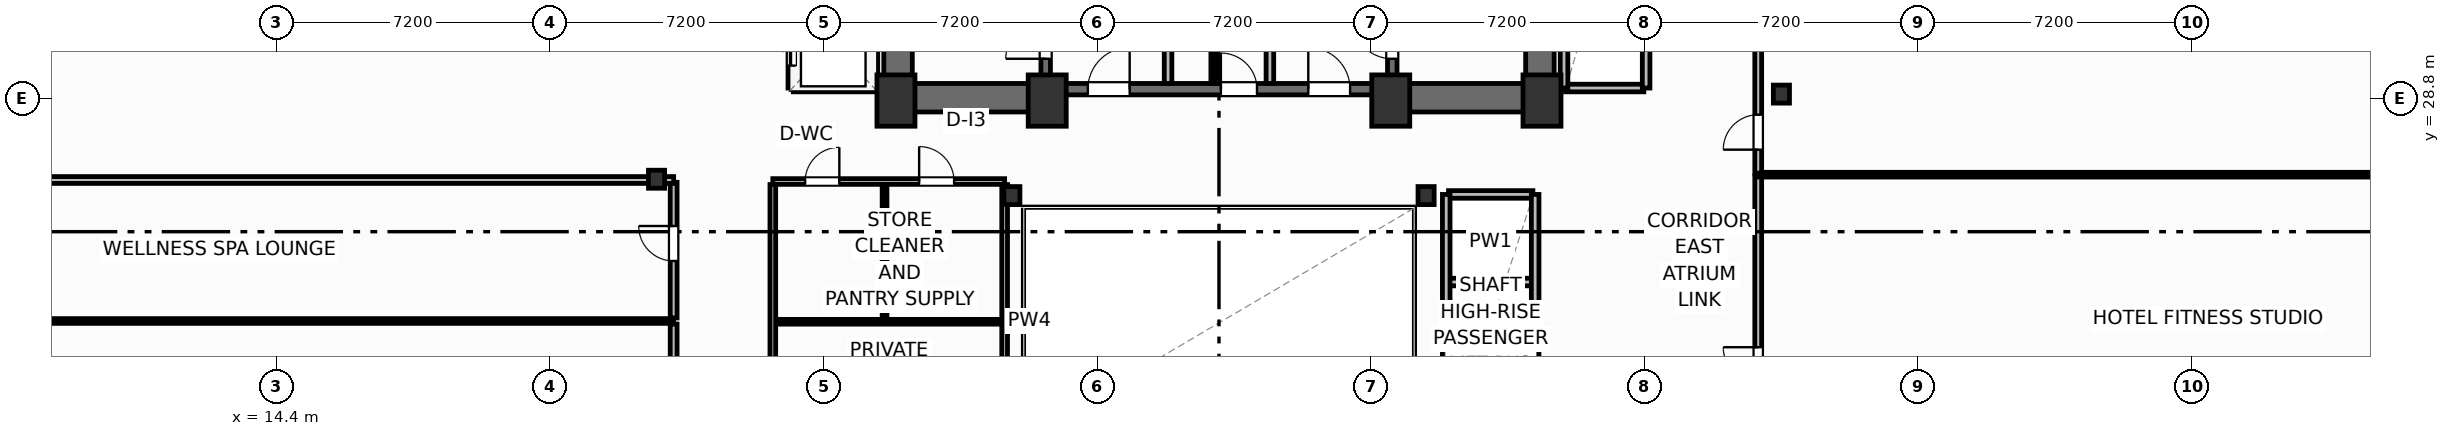
"""IFC4 building model, lengths in metres.
Left out: names, types, materials, properties, quantities, classifications, styles, units other than length and angle.
Written with IfcOpenShell. Run it as: python <this file> out.ifc"""

import sys

from ifc_helpers import new_model, si_unit, direction, frame, frame_2d, origin, origin_2d, place, context, subcontext, project, spatial, rectangle, i_section, extrude, element, fill, save


model = new_model("IFC4")
c1 = context("Model", 3, precision=1e-05, world=origin(), true_north=direction((0.0, 1.0)))
c2 = subcontext(c1, "Body", "Model", "MODEL_VIEW")
j1 = project(units=[si_unit("LENGTHUNIT", "METRE"), si_unit("PLANEANGLEUNIT", "RADIAN")], contexts=[c1])
p1 = place(None, origin())
s1 = spatial("IfcSite", under=j1, at=p1, CompositionType="ELEMENT")
p2 = place(p1, origin())
s2 = spatial("IfcBuilding", under=s1, at=p2, CompositionType="ELEMENT")
p3 = place(p2, frame((0.0, 0.0, 79.9)))
s3 = spatial("IfcBuildingStorey", under=s2, at=p3, CompositionType="ELEMENT", Elevation=79.9)
for number, where, z_axis, x_axis in (
    (1, (30.7, 28.75, 0.0), (0.0, 0.0, 1.0), (1.0, 0.0, 0.0)),
    (2, (34.68, 28.75, 0.0), (0.0, 0.0, 1.0), (1.0, 0.0, 0.0)),
    (3, (43.72, 28.75, 0.0), (0.0, 0.0, 1.0), (1.0, 0.0, 0.0)),
    (4, (47.7, 28.75, 0.0), (0.0, 0.0, 1.0), (1.0, 0.0, 0.0)),
):
    element("IfcColumn", number, at=place(p3, frame(where, z_axis=z_axis, x_axis=x_axis)), inside=s3, PredefinedType="COLUMN", context=c2, shape_type="SweptSolid", body=[
        extrude(rectangle(XDim=1.0, YDim=1.35, at=origin_2d()), origin(), (0.0, 0.0, 1.0), 3.7),
    ])
for number, where, z_axis, x_axis in (
    (5, (33.75, 26.25, 0.0), (0.0, 0.0, 1.0), (1.0, 0.0, 0.0)),
    (6, (44.65, 26.25, 0.0), (0.0, 0.0, 1.0), (1.0, 0.0, 0.0)),
    (7, (24.4, 26.68, 0.0), (0.0, 0.0, 1.0), (1.0, 0.0, 0.0)),
    (8, (54.0, 28.92, 0.0), (0.0, 0.0, 1.0), (1.0, 0.0, 0.0)),
):
    element("IfcColumn", number, at=place(p3, frame(where, z_axis=z_axis, x_axis=x_axis)), inside=s3, PredefinedType="COLUMN", context=c2, shape_type="SweptSolid", body=[
        extrude(i_section(OverallWidth=0.424, OverallDepth=0.474, WebThickness=0.048, FlangeThickness=0.077, FilletRadius=0.025, at=origin_2d()), origin(), (0.0, 0.0, 1.0), 3.7),
    ])
for number, where, z_axis, x_axis in (
    (9, (30.755, 29.2, 0.0), (0.0, 0.0, 1.0), (0.0, 1.0, 0.0)),
    (10, (47.645, 29.2, 0.0), (0.0, 0.0, 1.0), (0.0, 1.0, 0.0)),
):
    element("IfcWall", number, at=place(p3, frame(where, z_axis=z_axis, x_axis=x_axis)), inside=s3, PredefinedType="SHEAR", context=c2, shape_type="SweptSolid", body=[
        extrude(rectangle(XDim=9.22, YDim=0.75, at=frame_2d((4.61, 0.0))), origin(), (0.0, 0.0, 1.0), 3.45),
    ])
p4 = place(p3, frame((30.38, 28.825, 0.0), z_axis=(0.0, 0.0, 1.0), x_axis=(1.0, 0.0, 0.0)))
e11 = element("IfcWall", 11, at=p4, inside=s3, PredefinedType="SHEAR", context=c2, shape_type="SweptSolid", body=[
    extrude(rectangle(XDim=4.42, YDim=0.75, at=frame_2d((2.21, 0.0))), origin(), (0.0, 0.0, 1.0), 3.45),
])
p5 = place(p3, frame((43.6, 28.825, 0.0), z_axis=(0.0, 0.0, 1.0), x_axis=(1.0, 0.0, 0.0)))
e12 = element("IfcWall", 12, at=p5, inside=s3, PredefinedType="SHEAR", context=c2, shape_type="SweptSolid", body=[
    extrude(rectangle(XDim=4.42, YDim=0.75, at=frame_2d((2.21, 0.0))), origin(), (0.0, 0.0, 1.0), 3.45),
])
p6 = place(p3, frame((34.8, 29.05, 0.0), z_axis=(0.0, 0.0, 1.0), x_axis=(1.0, 0.0, 0.0)))
e13 = element("IfcWall", 13, at=p6, inside=s3, PredefinedType="SHEAR", context=c2, shape_type="SweptSolid", body=[
    extrude(rectangle(XDim=8.8, YDim=0.3, at=frame_2d((4.4, 0.0))), origin(), (0.0, 0.0, 1.0), 3.45),
])
p7 = place(p6, frame((0.95, 0.0, 0.0)))
e14 = element("IfcOpeningElement", 14, at=p7, cuts=e13, PredefinedType="OPENING", context=c2, shape_type="SweptSolid", body=[
    extrude(rectangle(XDim=1.1, YDim=2.15, at=frame_2d((0.55, 1.075))), frame((0.0, 0.16, 0.0), z_axis=(0.0, -1.0, 0.0), x_axis=(1.0, 0.0, 0.0)), (0.0, 0.0, 1.0), 0.32),
])
p8 = place(p6, frame((6.75, 0.0, 0.0)))
e15 = element("IfcOpeningElement", 15, at=p8, cuts=e13, PredefinedType="OPENING", context=c2, shape_type="SweptSolid", body=[
    extrude(rectangle(XDim=1.1, YDim=2.15, at=frame_2d((0.55, 1.075))), frame((0.0, 0.16, 0.0), z_axis=(0.0, -1.0, 0.0), x_axis=(1.0, 0.0, 0.0)), (0.0, 0.0, 1.0), 0.32),
])
p9 = place(p6, frame((4.45, 0.0, 0.0)))
e16 = element("IfcOpeningElement", 16, at=p9, cuts=e13, PredefinedType="OPENING", context=c2, shape_type="SweptSolid", body=[
    extrude(rectangle(XDim=0.95, YDim=2.15, at=frame_2d((0.475, 1.075))), frame((0.0, 0.16, 0.0), z_axis=(0.0, -1.0, 0.0), x_axis=(1.0, 0.0, 0.0)), (0.0, 0.0, 1.0), 0.32),
])
p10 = place(p3, frame((34.64, 29.2, 0.0), z_axis=(0.0, 0.0, 1.0), x_axis=(0.0, 1.0, 0.0)))
e17 = element("IfcWall", 17, at=p10, inside=s3, PredefinedType="SHEAR", context=c2, shape_type="SweptSolid", body=[
    extrude(rectangle(XDim=9.22, YDim=0.25, at=frame_2d((4.61, 0.0))), origin(), (0.0, 0.0, 1.0), 3.45),
])
p11 = place(p10, frame((0.65, 0.0, 0.0)))
e18 = element("IfcOpeningElement", 18, at=p11, cuts=e17, PredefinedType="OPENING", context=c2, shape_type="SweptSolid", body=[
    extrude(rectangle(XDim=1.05, YDim=2.15, at=frame_2d((0.525, 1.075))), frame((0.0, 0.135, 0.0), z_axis=(0.0, -1.0, 0.0), x_axis=(1.0, 0.0, 0.0)), (0.0, 0.0, 1.0), 0.27),
])
p12 = place(p3, frame((43.76, 29.2, 0.0), z_axis=(0.0, 0.0, 1.0), x_axis=(0.0, 1.0, 0.0)))
e19 = element("IfcWall", 19, at=p12, inside=s3, PredefinedType="SHEAR", context=c2, shape_type="SweptSolid", body=[
    extrude(rectangle(XDim=9.22, YDim=0.25, at=frame_2d((4.61, 0.0))), origin(), (0.0, 0.0, 1.0), 3.45),
])
p13 = place(p12, frame((0.65, 0.0, 0.0)))
e20 = element("IfcOpeningElement", 20, at=p13, cuts=e19, PredefinedType="OPENING", context=c2, shape_type="SweptSolid", body=[
    extrude(rectangle(XDim=1.05, YDim=2.15, at=frame_2d((0.525, 1.075))), frame((0.0, 0.135, 0.0), z_axis=(0.0, -1.0, 0.0), x_axis=(1.0, 0.0, 0.0)), (0.0, 0.0, 1.0), 0.27),
])
p14 = place(p3, frame((24.85, 19.3, 0.0), z_axis=(0.0, 0.0, 1.0), x_axis=(0.0, 1.0, 0.0)))
e21 = element("IfcWall", 21, at=p14, inside=s3, PredefinedType="PARTITIONING", context=c2, shape_type="SweptSolid", body=[
    extrude(rectangle(XDim=3.57, YDim=0.18, at=frame_2d((1.785, 0.0))), origin(), (0.0, 0.0, 1.0), 3.45),
])
p15 = place(p14, frame((1.5, 0.0, 0.0)))
e22 = element("IfcOpeningElement", 22, at=p15, cuts=e21, PredefinedType="OPENING", context=c2, shape_type="SweptSolid", body=[
    extrude(rectangle(XDim=0.92, YDim=2.05, at=frame_2d((0.46, 1.025))), frame((0.0, 0.1, 0.0), z_axis=(0.0, -1.0, 0.0), x_axis=(1.0, 0.0, 0.0)), (0.0, 0.0, 1.0), 0.2),
])
p16 = place(p3, frame((24.85, 23.03, 0.0), z_axis=(0.0, 0.0, 1.0), x_axis=(0.0, 1.0, 0.0)))
e23 = element("IfcWall", 23, at=p16, inside=s3, PredefinedType="PARTITIONING", context=c2, shape_type="SweptSolid", body=[
    extrude(rectangle(XDim=3.57, YDim=0.18, at=frame_2d((1.785, 0.0))), origin(), (0.0, 0.0, 1.0), 3.45),
])
p17 = place(p16, frame((1.5, 0.0, 0.0)))
e24 = element("IfcOpeningElement", 24, at=p17, cuts=e23, PredefinedType="OPENING", context=c2, shape_type="SweptSolid", body=[
    extrude(rectangle(XDim=0.92, YDim=2.05, at=frame_2d((0.46, 1.025))), frame((0.0, 0.1, 0.0), z_axis=(0.0, -1.0, 0.0), x_axis=(1.0, 0.0, 0.0)), (0.0, 0.0, 1.0), 0.2),
])
p18 = place(p3, frame((1.0, 22.95, 0.0), z_axis=(0.0, 0.0, 1.0), x_axis=(1.0, 0.0, 0.0)))
e25 = element("IfcWall", 25, at=p18, inside=s3, PredefinedType="PARTITIONING", context=c2, shape_type="SweptSolid", body=[
    extrude(rectangle(XDim=23.85, YDim=0.125, at=frame_2d((11.925, 0.0))), origin(), (0.0, 0.0, 1.0), 3.45),
])
p19 = place(p3, frame((-0.086, 26.66, 0.0), z_axis=(0.0, 0.0, 1.0), x_axis=(1.0, 0.0, 0.0)))
e26 = element("IfcWall", 26, at=p19, inside=s3, PredefinedType="PARTITIONING", context=c2, shape_type="SweptSolid", body=[
    extrude(rectangle(XDim=24.936, YDim=0.18, at=frame_2d((12.468, 0.0))), origin(), (0.0, 0.0, 1.0), 2.662),
])
p20 = place(p3, frame((53.39, 19.24, 0.0), z_axis=(0.0, 0.0, 1.0), x_axis=(0.0, 1.0, 0.0)))
e27 = element("IfcWall", 27, at=p20, inside=s3, PredefinedType="PARTITIONING", context=c2, shape_type="SweptSolid", body=[
    extrude(rectangle(XDim=7.52, YDim=0.18, at=frame_2d((3.76, 0.0))), origin(), (0.0, 0.0, 1.0), 3.45),
])
p21 = place(p20, frame((2.1, 0.0, 0.0)))
e28 = element("IfcOpeningElement", 28, at=p21, cuts=e27, PredefinedType="OPENING", context=c2, shape_type="SweptSolid", body=[
    extrude(rectangle(XDim=0.92, YDim=2.05, at=frame_2d((0.46, 1.025))), frame((0.0, 0.1, 0.0), z_axis=(0.0, -1.0, 0.0), x_axis=(1.0, 0.0, 0.0)), (0.0, 0.0, 1.0), 0.2),
])
p22 = place(p3, frame((53.39, 26.8, 0.0), z_axis=(0.0, 0.0, 1.0), x_axis=(1.0, 0.0, 0.0)))
e29 = element("IfcWall", 29, at=p22, inside=s3, PredefinedType="PARTITIONING", context=c2, shape_type="SweptSolid", body=[
    extrude(rectangle(XDim=23.61, YDim=0.125, at=frame_2d((11.805, 0.0))), origin(), (0.0, 0.0, 1.0), 3.45),
])
p23 = place(p3, frame((53.39, 26.84, 0.0), z_axis=(0.0, 0.0, 1.0), x_axis=(0.0, 1.0, 0.0)))
e30 = element("IfcWall", 30, at=p23, inside=s3, PredefinedType="PARTITIONING", context=c2, shape_type="SweptSolid", body=[
    extrude(rectangle(XDim=12.46, YDim=0.18, at=frame_2d((6.23, 0.0))), origin(), (0.0, 0.0, 1.0), 3.45),
])
p24 = place(p23, frame((0.618, 0.0, 0.0)))
e31 = element("IfcOpeningElement", 31, at=p24, cuts=e30, PredefinedType="OPENING", context=c2, shape_type="SweptSolid", body=[
    extrude(rectangle(XDim=0.92, YDim=2.05, at=frame_2d((0.46, 1.025))), frame((0.0, 0.1, 0.0), z_axis=(0.0, -1.0, 0.0), x_axis=(1.0, 0.0, 0.0)), (0.0, 0.0, 1.0), 0.2),
])
for number, where, z_axis, x_axis in (
    (32, (37.86, 29.2, 0.0), (0.0, 0.0, 1.0), (0.0, 1.0, 0.0)),
    (33, (40.54, 29.2, 0.0), (0.0, 0.0, 1.0), (0.0, 1.0, 0.0)),
):
    element("IfcWall", number, at=place(p3, frame(where, z_axis=z_axis, x_axis=x_axis)), inside=s3, PredefinedType="PARTITIONING", context=c2, shape_type="SweptSolid", body=[
        extrude(rectangle(XDim=5.18, YDim=0.2, at=frame_2d((2.59, 0.0))), origin(), (0.0, 0.0, 1.0), 3.45),
    ])
p25 = place(p3, frame((39.05, 29.2, 0.0), z_axis=(0.0, 0.0, 1.0), x_axis=(0.0, 1.0, 0.0)))
e34 = element("IfcWall", 34, at=p25, inside=s3, PredefinedType="PARTITIONING", context=c2, shape_type="SweptSolid", body=[
    extrude(rectangle(XDim=5.22, YDim=0.125, at=frame_2d((2.61, 0.0))), origin(), (0.0, 0.0, 1.0), 3.45),
])
p26 = place(p25, frame((2.05, 0.0, 0.0)))
e35 = element("IfcOpeningElement", 35, at=p26, cuts=e34, PredefinedType="OPENING", context=c2, shape_type="SweptSolid", body=[
    extrude(rectangle(XDim=0.85, YDim=2.05, at=frame_2d((0.425, 1.025))), frame((0.0, 0.073, 0.0), z_axis=(0.0, -1.0, 0.0), x_axis=(1.0, 0.0, 0.0)), (0.0, 0.0, 1.0), 0.145),
])
p27 = place(p3, frame((27.46, 26.62, 0.0), z_axis=(0.0, 0.0, 1.0), x_axis=(1.0, 0.0, 0.0)))
e36 = element("IfcWall", 36, at=p27, inside=s3, PredefinedType="PARTITIONING", context=c2, shape_type="SweptSolid", body=[
    extrude(rectangle(XDim=6.1, YDim=0.15, at=frame_2d((3.05, 0.0))), origin(), (0.0, 0.0, 1.0), 2.662),
])
p28 = place(p27, frame((0.85, 0.0, 0.0)))
e37 = element("IfcOpeningElement", 37, at=p28, cuts=e36, PredefinedType="OPENING", context=c2, shape_type="SweptSolid", body=[
    extrude(rectangle(XDim=0.9, YDim=2.05, at=frame_2d((0.45, 1.025))), frame((0.0, 0.085, 0.0), z_axis=(0.0, -1.0, 0.0), x_axis=(1.0, 0.0, 0.0)), (0.0, 0.0, 1.0), 0.17),
])
p29 = place(p27, frame((3.85, 0.0, 0.0)))
e38 = element("IfcOpeningElement", 38, at=p29, cuts=e36, PredefinedType="OPENING", context=c2, shape_type="SweptSolid", body=[
    extrude(rectangle(XDim=0.92, YDim=2.05, at=frame_2d((0.46, 1.025))), frame((0.0, 0.085, 0.0), z_axis=(0.0, -1.0, 0.0), x_axis=(1.0, 0.0, 0.0)), (0.0, 0.0, 1.0), 0.17),
])
p30 = place(p3, frame((27.52, 22.93, 0.0), z_axis=(0.0, 0.0, 1.0), x_axis=(1.0, 0.0, 0.0)))
e39 = element("IfcWall", 39, at=p30, inside=s3, PredefinedType="PARTITIONING", context=c2, shape_type="SweptSolid", body=[
    extrude(rectangle(XDim=6.0, YDim=0.125, at=frame_2d((3.0, 0.0))), origin(), (0.0, 0.0, 1.0), 3.45),
])
p31 = place(p3, frame((30.4, 23.0, 0.0), z_axis=(0.0, 0.0, 1.0), x_axis=(0.0, 1.0, 0.0)))
e40 = element("IfcWall", 40, at=p31, inside=s3, PredefinedType="PARTITIONING", context=c2, shape_type="SweptSolid", body=[
    extrude(rectangle(XDim=3.54, YDim=0.125, at=frame_2d((1.77, 0.0))), origin(), (0.0, 0.0, 1.0), 3.45),
])
p32 = place(p3, frame((27.46, 19.38, 0.0), z_axis=(0.0, 0.0, 1.0), x_axis=(0.0, 1.0, 0.0)))
e41 = element("IfcWall", 41, at=p32, inside=s3, PredefinedType="PARTITIONING", context=c2, shape_type="SweptSolid", body=[
    extrude(rectangle(XDim=7.16, YDim=0.15, at=frame_2d((3.58, 0.0))), origin(), (0.0, 0.0, 1.0), 3.45),
])
p33 = place(p32, frame((1.1, 0.0, 0.0)))
e42 = element("IfcOpeningElement", 42, at=p33, cuts=e41, PredefinedType="OPENING", context=c2, shape_type="SweptSolid", body=[
    extrude(rectangle(XDim=0.95, YDim=2.05, at=frame_2d((0.475, 1.025))), frame((0.0, 0.085, 0.0), z_axis=(0.0, -1.0, 0.0), x_axis=(1.0, 0.0, 0.0)), (0.0, 0.0, 1.0), 0.17),
])
p34 = place(p3, frame((33.56, 19.38, 0.0), z_axis=(0.0, 0.0, 1.0), x_axis=(0.0, 1.0, 0.0)))
e43 = element("IfcWall", 43, at=p34, inside=s3, PredefinedType="PARTITIONING", context=c2, shape_type="SweptSolid", body=[
    extrude(rectangle(XDim=7.16, YDim=0.15, at=frame_2d((3.58, 0.0))), origin(), (0.0, 0.0, 1.0), 2.824),
])
p35 = place(p3, frame((28.0, 29.08, 0.0), z_axis=(0.0, 0.0, 1.0), x_axis=(1.0, 0.0, 0.0)))
e44 = element("IfcWall", 44, at=p35, inside=s3, PredefinedType="PARTITIONING", context=c2, shape_type="SweptSolid", body=[
    extrude(rectangle(XDim=2.1, YDim=0.2, at=frame_2d((1.05, 0.0))), origin(), (0.0, 0.0, 1.0), 3.45),
])
p36 = place(p3, frame((30.12, 29.08, 0.0), z_axis=(0.0, 0.0, 1.0), x_axis=(0.0, 1.0, 0.0)))
e45 = element("IfcWall", 45, at=p36, inside=s3, PredefinedType="PARTITIONING", context=c2, shape_type="SweptSolid", body=[
    extrude(rectangle(XDim=6.89, YDim=0.2, at=frame_2d((3.445, 0.0))), origin(), (0.0, 0.0, 1.0), 3.45),
])
p37 = place(p3, frame((27.96, 29.08, 0.0), z_axis=(0.0, 0.0, 1.0), x_axis=(0.0, 1.0, 0.0)))
e46 = element("IfcWall", 46, at=p37, inside=s3, PredefinedType="PARTITIONING", context=c2, shape_type="SweptSolid", body=[
    extrude(rectangle(XDim=6.89, YDim=0.2, at=frame_2d((3.445, 0.0))), origin(), (0.0, 0.0, 1.0), 3.45),
])
p38 = place(p37, frame((0.59, 0.0, 0.0)))
e47 = element("IfcOpeningElement", 47, at=p38, cuts=e46, PredefinedType="OPENING", context=c2, shape_type="SweptSolid", body=[
    extrude(rectangle(XDim=1.1, YDim=2.15, at=frame_2d((0.55, 1.075))), frame((0.0, 0.11, 0.0), z_axis=(0.0, -1.0, 0.0), x_axis=(1.0, 0.0, 0.0)), (0.0, 0.0, 1.0), 0.22),
])
p39 = place(p37, frame((2.89, 0.0, 0.0)))
e48 = element("IfcOpeningElement", 48, at=p39, cuts=e46, PredefinedType="OPENING", context=c2, shape_type="SweptSolid", body=[
    extrude(rectangle(XDim=1.1, YDim=2.15, at=frame_2d((0.55, 1.075))), frame((0.0, 0.11, 0.0), z_axis=(0.0, -1.0, 0.0), x_axis=(1.0, 0.0, 0.0)), (0.0, 0.0, 1.0), 0.22),
])
p40 = place(p37, frame((5.19, 0.0, 0.0)))
e49 = element("IfcOpeningElement", 49, at=p40, cuts=e46, PredefinedType="OPENING", context=c2, shape_type="SweptSolid", body=[
    extrude(rectangle(XDim=1.1, YDim=2.15, at=frame_2d((0.55, 1.075))), frame((0.0, 0.11, 0.0), z_axis=(0.0, -1.0, 0.0), x_axis=(1.0, 0.0, 0.0)), (0.0, 0.0, 1.0), 0.22),
])
p41 = place(p3, frame((48.32, 29.08, 0.0), z_axis=(0.0, 0.0, 1.0), x_axis=(1.0, 0.0, 0.0)))
e50 = element("IfcWall", 50, at=p41, inside=s3, PredefinedType="PARTITIONING", context=c2, shape_type="SweptSolid", body=[
    extrude(rectangle(XDim=2.06, YDim=0.2, at=frame_2d((1.03, 0.0))), origin(), (0.0, 0.0, 1.0), 2.662),
])
for number, where, z_axis, x_axis in (
    (51, (48.28, 29.08, 0.0), (0.0, 0.0, 1.0), (0.0, 1.0, 0.0)),
    (52, (50.44, 29.08, 0.0), (0.0, 0.0, 1.0), (0.0, 1.0, 0.0)),
):
    element("IfcWall", number, at=place(p3, frame(where, z_axis=z_axis, x_axis=x_axis)), inside=s3, PredefinedType="PARTITIONING", context=c2, shape_type="SweptSolid", body=[
        extrude(rectangle(XDim=6.89, YDim=0.2, at=frame_2d((3.445, 0.0))), origin(), (0.0, 0.0, 1.0), 3.45),
    ])
for number, where, z_axis, x_axis in (
    (53, (45.24, 23.975, 0.0), (0.0, 0.0, 1.0), (1.0, 0.0, 0.0)),
    (54, (45.24, 26.28, 0.0), (0.0, 0.0, 1.0), (1.0, 0.0, 0.0)),
):
    element("IfcWall", number, at=place(p3, frame(where, z_axis=z_axis, x_axis=x_axis)), inside=s3, PredefinedType="PARTITIONING", context=c2, shape_type="SweptSolid", body=[
        extrude(rectangle(XDim=2.22, YDim=0.2, at=frame_2d((1.11, 0.0))), origin(), (0.0, 0.0, 1.0), 3.45),
    ])
for number, where, z_axis, x_axis in (
    (55, (45.18, 19.38, 0.0), (0.0, 0.0, 1.0), (0.0, 1.0, 0.0)),
    (56, (47.52, 19.38, 0.0), (0.0, 0.0, 1.0), (0.0, 1.0, 0.0)),
):
    element("IfcWall", number, at=place(p3, frame(where, z_axis=z_axis, x_axis=x_axis)), inside=s3, PredefinedType="PARTITIONING", context=c2, shape_type="SweptSolid", body=[
        extrude(rectangle(XDim=6.9, YDim=0.2, at=frame_2d((3.45, 0.0))), origin(), (0.0, 0.0, 1.0), 3.45),
    ])
p42 = place(p17, origin())
e57 = element("IfcDoor", 57, at=p42, inside=s3, OperationType="SINGLE_SWING_RIGHT", PredefinedType="DOOR", context=c2, shape_type="SweptSolid", body=[
    extrude(rectangle(XDim=0.92, YDim=2.05, at=frame_2d((0.46, 1.025))), frame((0.0, 0.025, 0.0), z_axis=(0.0, -1.0, 0.0), x_axis=(1.0, 0.0, 0.0)), (0.0, 0.0, 1.0), 0.05),
])
fill(e24, e57)
p43 = place(p21, origin())
e58 = element("IfcDoor", 58, at=p43, inside=s3, OperationType="SINGLE_SWING_RIGHT", PredefinedType="DOOR", context=c2, shape_type="SweptSolid", body=[
    extrude(rectangle(XDim=0.92, YDim=2.05, at=frame_2d((0.46, 1.025))), frame((0.0, 0.025, 0.0), z_axis=(0.0, -1.0, 0.0), x_axis=(1.0, 0.0, 0.0)), (0.0, 0.0, 1.0), 0.05),
])
fill(e28, e58)
p44 = place(p24, origin())
e59 = element("IfcDoor", 59, at=p44, inside=s3, OperationType="SINGLE_SWING_LEFT", PredefinedType="DOOR", context=c2, shape_type="SweptSolid", body=[
    extrude(rectangle(XDim=0.92, YDim=2.05, at=frame_2d((0.46, 1.025))), frame((0.0, 0.025, 0.0), z_axis=(0.0, -1.0, 0.0), x_axis=(1.0, 0.0, 0.0)), (0.0, 0.0, 1.0), 0.05),
])
fill(e31, e59)
p45 = place(p11, origin())
e60 = element("IfcDoor", 60, at=p45, inside=s3, OperationType="SINGLE_SWING_LEFT", PredefinedType="DOOR", context=c2, shape_type="SweptSolid", body=[
    extrude(rectangle(XDim=1.05, YDim=2.15, at=frame_2d((0.525, 1.075))), frame((0.0, 0.025, 0.0), z_axis=(0.0, -1.0, 0.0), x_axis=(1.0, 0.0, 0.0)), (0.0, 0.0, 1.0), 0.05),
])
fill(e18, e60)
p46 = place(p13, origin())
e61 = element("IfcDoor", 61, at=p46, inside=s3, OperationType="SINGLE_SWING_RIGHT", PredefinedType="DOOR", context=c2, shape_type="SweptSolid", body=[
    extrude(rectangle(XDim=1.05, YDim=2.15, at=frame_2d((0.525, 1.075))), frame((0.0, 0.025, 0.0), z_axis=(0.0, -1.0, 0.0), x_axis=(1.0, 0.0, 0.0)), (0.0, 0.0, 1.0), 0.05),
])
fill(e20, e61)
p47 = place(p7, origin())
e62 = element("IfcDoor", 62, at=p47, inside=s3, OperationType="SINGLE_SWING_RIGHT", PredefinedType="DOOR", context=c2, shape_type="SweptSolid", body=[
    extrude(rectangle(XDim=1.1, YDim=2.15, at=frame_2d((0.55, 1.075))), frame((0.0, 0.025, 0.0), z_axis=(0.0, -1.0, 0.0), x_axis=(1.0, 0.0, 0.0)), (0.0, 0.0, 1.0), 0.05),
])
fill(e14, e62)
p48 = place(p8, origin())
e63 = element("IfcDoor", 63, at=p48, inside=s3, OperationType="SINGLE_SWING_LEFT", PredefinedType="DOOR", context=c2, shape_type="SweptSolid", body=[
    extrude(rectangle(XDim=1.1, YDim=2.15, at=frame_2d((0.55, 1.075))), frame((0.0, 0.025, 0.0), z_axis=(0.0, -1.0, 0.0), x_axis=(1.0, 0.0, 0.0)), (0.0, 0.0, 1.0), 0.05),
])
fill(e15, e63)
p49 = place(p9, origin())
e64 = element("IfcDoor", 64, at=p49, inside=s3, OperationType="SINGLE_SWING_LEFT", PredefinedType="DOOR", context=c2, shape_type="SweptSolid", body=[
    extrude(rectangle(XDim=0.95, YDim=2.15, at=frame_2d((0.475, 1.075))), frame((0.0, 0.025, 0.0), z_axis=(0.0, -1.0, 0.0), x_axis=(1.0, 0.0, 0.0)), (0.0, 0.0, 1.0), 0.05),
])
fill(e16, e64)
p50 = place(p28, origin())
e65 = element("IfcDoor", 65, at=p50, inside=s3, OperationType="SINGLE_SWING_RIGHT", PredefinedType="DOOR", context=c2, shape_type="SweptSolid", body=[
    extrude(rectangle(XDim=0.9, YDim=2.05, at=frame_2d((0.45, 1.025))), frame((0.0, 0.025, 0.0), z_axis=(0.0, -1.0, 0.0), x_axis=(1.0, 0.0, 0.0)), (0.0, 0.0, 1.0), 0.05),
])
fill(e37, e65)
p51 = place(p29, origin())
e66 = element("IfcDoor", 66, at=p51, inside=s3, OperationType="SINGLE_SWING_LEFT", PredefinedType="DOOR", context=c2, shape_type="SweptSolid", body=[
    extrude(rectangle(XDim=0.92, YDim=2.05, at=frame_2d((0.46, 1.025))), frame((0.0, 0.025, 0.0), z_axis=(0.0, -1.0, 0.0), x_axis=(1.0, 0.0, 0.0)), (0.0, 0.0, 1.0), 0.05),
])
fill(e38, e66)
p52 = place(p38, origin())
e67 = element("IfcDoor", 67, at=p52, inside=s3, OperationType="SLIDING_TO_LEFT", PredefinedType="DOOR", context=c2, shape_type="SweptSolid", body=[
    extrude(rectangle(XDim=1.1, YDim=2.15, at=frame_2d((0.55, 1.075))), frame((0.0, 0.025, 0.0), z_axis=(0.0, -1.0, 0.0), x_axis=(1.0, 0.0, 0.0)), (0.0, 0.0, 1.0), 0.05),
])
fill(e47, e67)
save(model, sys.argv[1])
